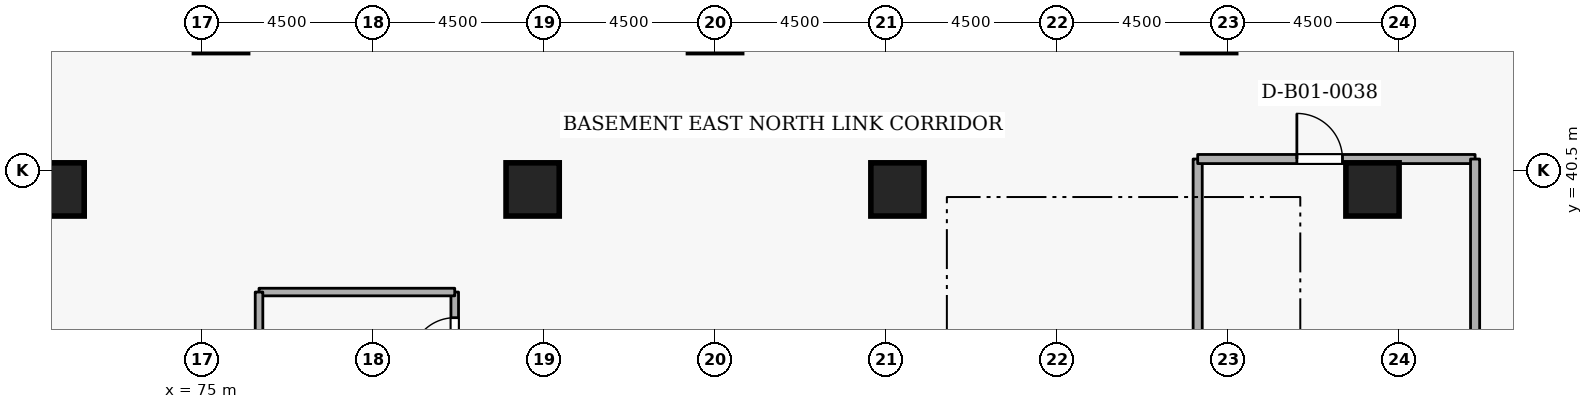
"""IFC4 building model, lengths in metres.
Left out: names, types, materials, properties, quantities, classifications, styles, units other than length and angle.
Written with IfcOpenShell. Run it as: python <this file> out.ifc"""

import sys

from ifc_helpers import new_model, si_unit, direction, frame, frame_2d, origin, origin_2d, place, context, subcontext, project, spatial, rectangle, extrude, element, fill, save


model = new_model("IFC4")
c1 = context("Model", 3, precision=1e-05, world=origin(), true_north=direction((0.0, 1.0)))
c2 = subcontext(c1, "Body", "Model", "MODEL_VIEW")
j1 = project(units=[si_unit("LENGTHUNIT", "METRE"), si_unit("PLANEANGLEUNIT", "RADIAN")], contexts=[c1])
p1 = place(None, origin())
s1 = spatial("IfcSite", under=j1, at=p1, CompositionType="ELEMENT")
p2 = place(p1, origin())
s2 = spatial("IfcBuilding", under=s1, at=p2, CompositionType="ELEMENT")
p3 = place(p2, frame((0.0, 0.0, -5.4)))
s3 = spatial("IfcBuildingStorey", under=s2, at=p3, CompositionType="ELEMENT", Elevation=-5.4)
for number, where, z_axis, x_axis in (
    (1, (105.8, 40.0, -0.6), (0.0, 0.0, 1.0), (1.0, 0.0, 0.0)),
    (2, (71.2, 40.0, -0.6), (0.0, 0.0, 1.0), (1.0, 0.0, 0.0)),
    (3, (93.3, 40.0, -0.6), (0.0, 0.0, 1.0), (1.0, 0.0, 0.0)),
    (4, (83.7, 40.0, -0.6), (0.0, 0.0, 1.0), (1.0, 0.0, 0.0)),
):
    element("IfcColumn", number, at=place(p3, frame(where, z_axis=z_axis, x_axis=x_axis)), inside=s3, PredefinedType="COLUMN", context=c2, shape_type="SweptSolid", body=[
        extrude(rectangle(XDim=1.4, YDim=1.4, at=origin_2d()), origin(), (0.0, 0.0, 1.0), 6.0),
    ])
p4 = place(p3, frame((81.65, 34.8, 0.0), z_axis=(0.0, 0.0, 1.0), x_axis=(0.0, 1.0, 0.0)))
e5 = element("IfcWall", 5, at=p4, inside=s3, PredefinedType="STANDARD", context=c2, shape_type="SweptSolid", body=[
    extrude(rectangle(XDim=2.5, YDim=0.2, at=frame_2d((1.25, 0.0))), origin(), (0.0, 0.0, 1.0), 5.06),
])
p5 = place(p4, frame((0.675, 0.0, 0.0)))
e6 = element("IfcOpeningElement", 6, at=p5, cuts=e5, PredefinedType="OPENING", context=c2, shape_type="SweptSolid", body=[
    extrude(rectangle(XDim=1.15, YDim=2.1, at=frame_2d((0.575, 1.05))), frame((0.0, 0.11, 0.0), z_axis=(0.0, -1.0, 0.0), x_axis=(1.0, 0.0, 0.0)), (0.0, 0.0, 1.0), 0.22),
])
p6 = place(p3, frame((81.65, 37.3, 0.0), z_axis=(0.0, 0.0, 1.0), x_axis=(-1.0, 0.0, 0.0)))
e7 = element("IfcWall", 7, at=p6, inside=s3, PredefinedType="STANDARD", context=c2, shape_type="SweptSolid", body=[
    extrude(rectangle(XDim=5.15, YDim=0.2, at=frame_2d((2.575, 0.0))), origin(), (0.0, 0.0, 1.0), 5.06),
])
p7 = place(p3, frame((76.5, 37.3, 0.0), z_axis=(0.0, 0.0, 1.0), x_axis=(0.0, -1.0, 0.0)))
e8 = element("IfcWall", 8, at=p7, inside=s3, PredefinedType="STANDARD", context=c2, shape_type="SweptSolid", body=[
    extrude(rectangle(XDim=2.5, YDim=0.2, at=frame_2d((1.25, 0.0))), origin(), (0.0, 0.0, 1.0), 5.06),
])
p8 = place(p3, frame((101.2, 16.65, 0.0), z_axis=(0.0, 0.0, 1.0), x_axis=(0.0, 1.0, 0.0)))
e9 = element("IfcWall", 9, at=p8, inside=s3, PredefinedType="STANDARD", context=c2, shape_type="SweptSolid", body=[
    extrude(rectangle(XDim=24.15, YDim=0.24, at=frame_2d((12.075, 0.0))), origin(), (0.0, 0.0, 1.0), 5.06),
])
p9 = place(p3, frame((101.2, 40.8, 0.0), z_axis=(0.0, 0.0, 1.0), x_axis=(1.0, 0.0, 0.0)))
e10 = element("IfcWall", 10, at=p9, inside=s3, PredefinedType="STANDARD", context=c2, shape_type="SweptSolid", body=[
    extrude(rectangle(XDim=7.3, YDim=0.24, at=frame_2d((3.65, 0.0))), origin(), (0.0, 0.0, 1.0), 5.06),
])
p10 = place(p9, frame((2.61, 0.0, 0.0)))
e11 = element("IfcOpeningElement", 11, at=p10, cuts=e10, PredefinedType="OPENING", context=c2, shape_type="SweptSolid", body=[
    extrude(rectangle(XDim=1.2, YDim=2.1, at=frame_2d((0.6, 1.05))), frame((0.0, 0.13, 0.0), z_axis=(0.0, -1.0, 0.0), x_axis=(1.0, 0.0, 0.0)), (0.0, 0.0, 1.0), 0.26),
])
p11 = place(p3, frame((108.5, 40.8, 0.0), z_axis=(0.0, 0.0, 1.0), x_axis=(0.0, -1.0, 0.0)))
e12 = element("IfcWall", 12, at=p11, inside=s3, PredefinedType="STANDARD", context=c2, shape_type="SweptSolid", body=[
    extrude(rectangle(XDim=24.15, YDim=0.24, at=frame_2d((12.075, 0.0))), origin(), (0.0, 0.0, 1.0), 5.06),
])
p12 = place(p5, origin())
e13 = element("IfcDoor", 13, at=p12, inside=s3, OperationType="SINGLE_SWING_LEFT", PredefinedType="DOOR", context=c2, shape_type="SweptSolid", body=[
    extrude(rectangle(XDim=1.15, YDim=2.1, at=frame_2d((0.575, 1.05))), frame((0.0, 0.025, 0.0), z_axis=(0.0, -1.0, 0.0), x_axis=(1.0, 0.0, 0.0)), (0.0, 0.0, 1.0), 0.05),
])
fill(e6, e13)
p13 = place(p10, origin())
e14 = element("IfcDoor", 14, at=p13, inside=s3, OperationType="SINGLE_SWING_LEFT", PredefinedType="DOOR", context=c2, shape_type="SweptSolid", body=[
    extrude(rectangle(XDim=1.2, YDim=2.1, at=frame_2d((0.6, 1.05))), frame((0.0, 0.025, 0.0), z_axis=(0.0, -1.0, 0.0), x_axis=(1.0, 0.0, 0.0)), (0.0, 0.0, 1.0), 0.05),
])
fill(e11, e14)
save(model, sys.argv[1])
